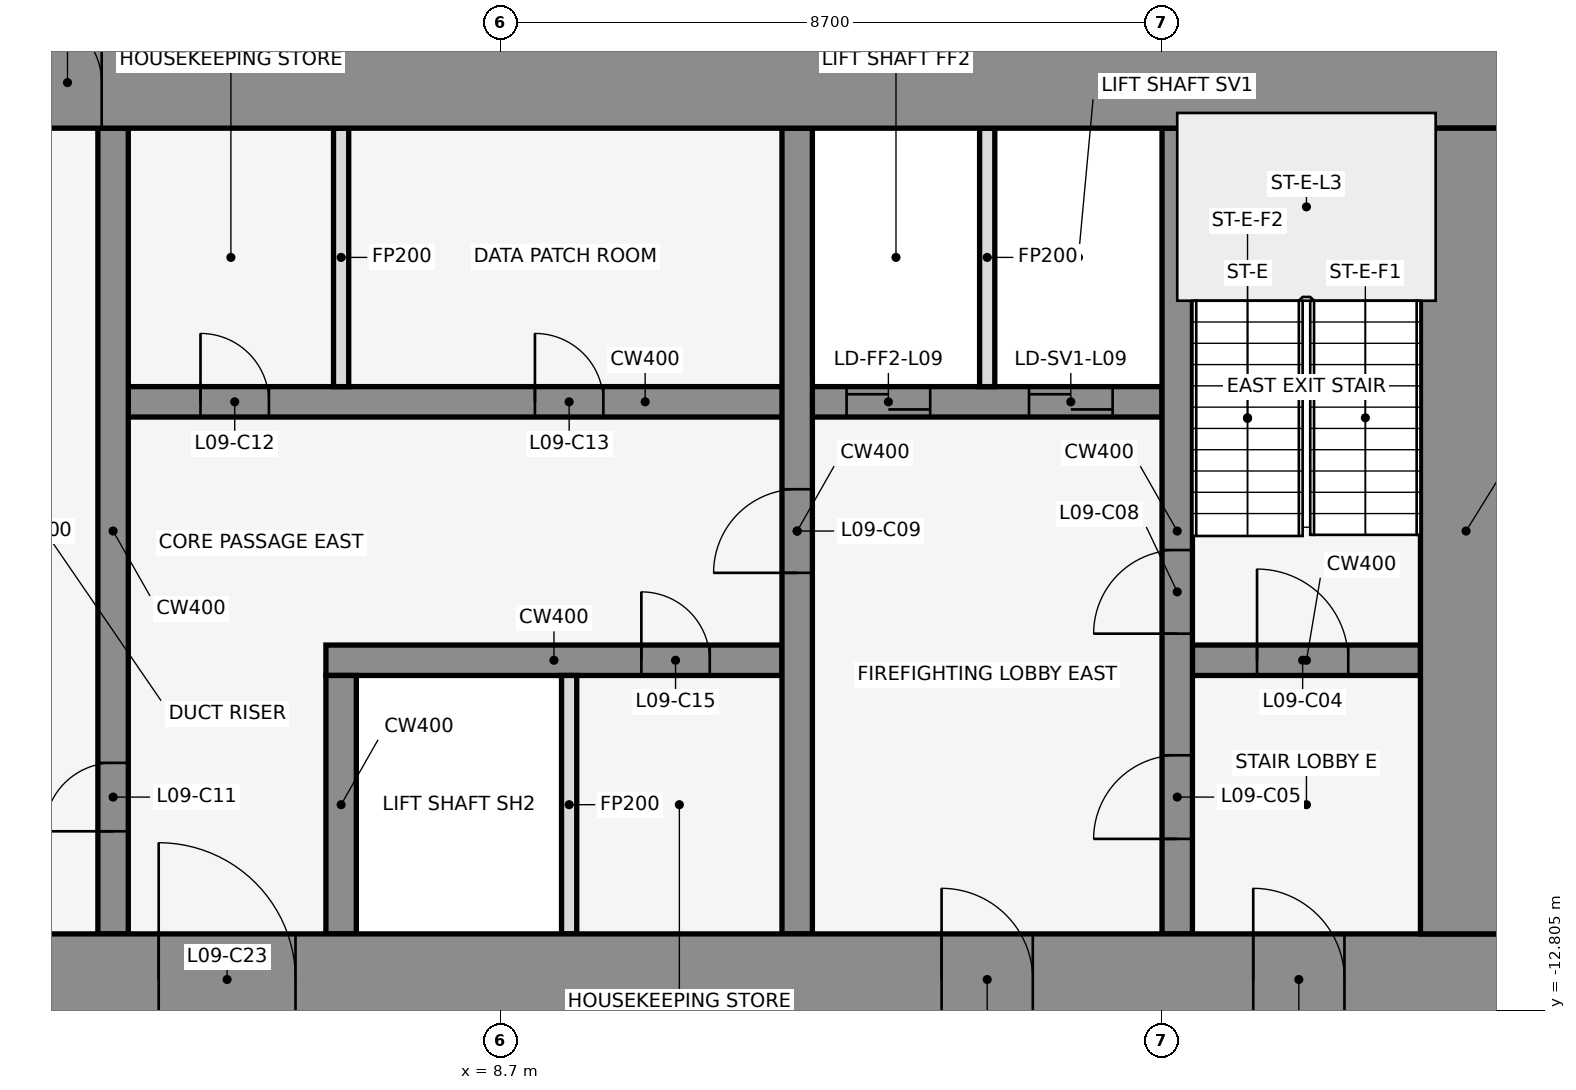
"""IFC4 building model, lengths in metres.
Left out: names, types, materials, properties, quantities, classifications, styles, units other than length and angle.
Written with IfcOpenShell. Run it as: python <this file> out.ifc"""

import sys

from ifc_helpers import new_model, si_unit, direction, frame, frame_2d, origin, place, context, subcontext, project, spatial, rectangle, extrude, element, fill, save


model = new_model("IFC4")
c1 = context("Model", 3, precision=1e-05, world=origin(), true_north=direction((0.0, 1.0)))
c2 = subcontext(c1, "Body", "Model", "MODEL_VIEW")
j1 = project(units=[si_unit("LENGTHUNIT", "METRE"), si_unit("PLANEANGLEUNIT", "RADIAN")], contexts=[c1])
p1 = place(None, origin())
s1 = spatial("IfcSite", under=j1, at=p1, CompositionType="ELEMENT")
p2 = place(p1, origin())
s2 = spatial("IfcBuilding", under=s1, at=p2, CompositionType="ELEMENT")
p3 = place(p2, frame((0.0, 0.0, 48.5)))
s3 = spatial("IfcBuildingStorey", under=s2, at=p3, CompositionType="ELEMENT", Elevation=48.5)
p4 = place(p3, frame((16.432, -0.105, 0.0), z_axis=(0.0, 0.0, 1.0), x_axis=(-0.83981312244, 0.542875602121, 0.0)))
e1 = element("IfcWall", 1, at=p4, inside=s3, PredefinedType="STANDARD", context=c2, shape_type="SweptSolid", body=[
    extrude(rectangle(XDim=2.183, YDim=0.25, at=frame_2d((1.091, 0.0))), origin(), (0.0, 0.0, 1.0), 4.35),
])
p5 = place(p3, frame((6.4, -8.2, 0.0), z_axis=(0.0, 0.0, 1.0), x_axis=(1.0, 0.0, 0.0)))
e2 = element("IfcWall", 2, at=p5, inside=s3, PredefinedType="SHEAR", context=c2, shape_type="SweptSolid", body=[
    extrude(rectangle(XDim=6.0, YDim=0.4, at=frame_2d((3.0, 0.0))), origin(), (0.0, 0.0, 1.0), 4.5),
])
p6 = place(p5, frame((4.15, 0.0, 0.0)))
e3 = element("IfcOpeningElement", 3, at=p6, cuts=e2, PredefinedType="OPENING", context=c2, shape_type="SweptSolid", body=[
    extrude(rectangle(XDim=0.9, YDim=2.1, at=frame_2d((0.45, 1.05))), frame((0.0, 0.212, 0.0), z_axis=(0.0, -1.0, 0.0), x_axis=(1.0, 0.0, 0.0)), (0.0, 0.0, 1.0), 0.424),
])
p7 = place(p3, frame((17.8, -8.2, 0.0), z_axis=(0.0, 0.0, 1.0), x_axis=(1.0, 0.0, 0.0)))
e4 = element("IfcWall", 4, at=p7, inside=s3, PredefinedType="SHEAR", context=c2, shape_type="SweptSolid", body=[
    extrude(rectangle(XDim=3.0, YDim=0.4, at=frame_2d((1.5, 0.0))), origin(), (0.0, 0.0, 1.0), 4.5),
])
p8 = place(p7, frame((0.85, 0.0, 0.0)))
e5 = element("IfcOpeningElement", 5, at=p8, cuts=e4, PredefinedType="OPENING", context=c2, shape_type="SweptSolid", body=[
    extrude(rectangle(XDim=1.2, YDim=2.1, at=frame_2d((0.6, 1.05))), frame((0.0, 0.212, 0.0), z_axis=(0.0, -1.0, 0.0), x_axis=(1.0, 0.0, 0.0)), (0.0, 0.0, 1.0), 0.424),
])
p9 = place(p3, frame((3.8, -4.8, 0.0), z_axis=(0.0, 0.0, 1.0), x_axis=(1.0, 0.0, 0.0)))
e6 = element("IfcWall", 6, at=p9, inside=s3, PredefinedType="SHEAR", context=c2, shape_type="SweptSolid", body=[
    extrude(rectangle(XDim=13.6, YDim=0.4, at=frame_2d((6.8, 0.0))), origin(), (0.0, 0.0, 1.0), 4.5),
])
p10 = place(p9, frame((9.45, 0.0, 0.0)))
e7 = element("IfcOpeningElement", 7, at=p10, cuts=e6, PredefinedType="OPENING", context=c2, shape_type="SweptSolid", body=[
    extrude(rectangle(XDim=1.1, YDim=2.1, at=frame_2d((0.55, 1.05))), frame((0.0, 0.212, 0.0), z_axis=(0.0, -1.0, 0.0), x_axis=(1.0, 0.0, 0.0)), (0.0, 0.0, 1.0), 0.424),
])
p11 = place(p9, frame((11.85, 0.0, 0.0)))
e8 = element("IfcOpeningElement", 8, at=p11, cuts=e6, PredefinedType="OPENING", context=c2, shape_type="SweptSolid", body=[
    extrude(rectangle(XDim=1.1, YDim=2.1, at=frame_2d((0.55, 1.05))), frame((0.0, 0.212, 0.0), z_axis=(0.0, -1.0, 0.0), x_axis=(1.0, 0.0, 0.0)), (0.0, 0.0, 1.0), 0.424),
])
p12 = place(p9, frame((0.95, 0.0, 0.0)))
e9 = element("IfcOpeningElement", 9, at=p12, cuts=e6, PredefinedType="OPENING", context=c2, shape_type="SweptSolid", body=[
    extrude(rectangle(XDim=0.9, YDim=2.1, at=frame_2d((0.45, 1.05))), frame((0.0, 0.212, 0.0), z_axis=(0.0, -1.0, 0.0), x_axis=(1.0, 0.0, 0.0)), (0.0, 0.0, 1.0), 0.424),
])
p13 = place(p9, frame((5.35, 0.0, 0.0)))
e10 = element("IfcOpeningElement", 10, at=p13, cuts=e6, PredefinedType="OPENING", context=c2, shape_type="SweptSolid", body=[
    extrude(rectangle(XDim=0.9, YDim=2.1, at=frame_2d((0.45, 1.05))), frame((0.0, 0.212, 0.0), z_axis=(0.0, -1.0, 0.0), x_axis=(1.0, 0.0, 0.0)), (0.0, 0.0, 1.0), 0.424),
])
p14 = place(p3, frame((3.6, -11.8, 0.0), z_axis=(0.0, 0.0, 1.0), x_axis=(0.0, 1.0, 0.0)))
e11 = element("IfcWall", 11, at=p14, inside=s3, PredefinedType="SHEAR", context=c2, shape_type="SweptSolid", body=[
    extrude(rectangle(XDim=10.6, YDim=0.4, at=frame_2d((5.3, 0.0))), origin(), (0.0, 0.0, 1.0), 4.5),
])
p15 = place(p14, frame((1.35, 0.0, 0.0)))
e12 = element("IfcOpeningElement", 12, at=p15, cuts=e11, PredefinedType="OPENING", context=c2, shape_type="SweptSolid", body=[
    extrude(rectangle(XDim=0.9, YDim=2.1, at=frame_2d((0.45, 1.05))), frame((0.0, 0.212, 0.0), z_axis=(0.0, -1.0, 0.0), x_axis=(1.0, 0.0, 0.0)), (0.0, 0.0, 1.0), 0.424),
])
p16 = place(p3, frame((6.6, -11.8, 0.0), z_axis=(0.0, 0.0, 1.0), x_axis=(0.0, 1.0, 0.0)))
e13 = element("IfcWall", 13, at=p16, inside=s3, PredefinedType="SHEAR", context=c2, shape_type="SweptSolid", body=[
    extrude(rectangle(XDim=3.4, YDim=0.4, at=frame_2d((1.7, 0.0))), origin(), (0.0, 0.0, 1.0), 4.5),
])
for number, where, z_axis, x_axis in (
    (14, (6.6, -4.6, 0.0), (0.0, 0.0, 1.0), (0.0, 1.0, 0.0)),
    (15, (9.6, -11.8, 0.0), (0.0, 0.0, 1.0), (0.0, 1.0, 0.0)),
):
    element("IfcWall", number, at=place(p3, frame(where, z_axis=z_axis, x_axis=x_axis)), inside=s3, PredefinedType="PARTITIONING", context=c2, shape_type="SweptSolid", body=[
        extrude(rectangle(XDim=3.4, YDim=0.2, at=frame_2d((1.7, 0.0))), origin(), (0.0, 0.0, 1.0), 3.418),
    ])
p17 = place(p3, frame((12.6, -11.8, 0.0), z_axis=(0.0, 0.0, 1.0), x_axis=(0.0, 1.0, 0.0)))
e16 = element("IfcWall", 16, at=p17, inside=s3, PredefinedType="SHEAR", context=c2, shape_type="SweptSolid", body=[
    extrude(rectangle(XDim=10.6, YDim=0.4, at=frame_2d((5.3, 0.0))), origin(), (0.0, 0.0, 1.0), 4.5),
])
p18 = place(p17, frame((4.75, 0.0, 0.0)))
e17 = element("IfcOpeningElement", 17, at=p18, cuts=e16, PredefinedType="OPENING", context=c2, shape_type="SweptSolid", body=[
    extrude(rectangle(XDim=1.1, YDim=2.1, at=frame_2d((0.55, 1.05))), frame((0.0, 0.212, 0.0), z_axis=(0.0, -1.0, 0.0), x_axis=(1.0, 0.0, 0.0)), (0.0, 0.0, 1.0), 0.424),
])
p19 = place(p3, frame((15.1, -4.6, 0.0), z_axis=(0.0, 0.0, 1.0), x_axis=(0.0, 1.0, 0.0)))
e18 = element("IfcWall", 18, at=p19, inside=s3, PredefinedType="PARTITIONING", context=c2, shape_type="SweptSolid", body=[
    extrude(rectangle(XDim=3.4, YDim=0.2, at=frame_2d((1.7, 0.0))), origin(), (0.0, 0.0, 1.0), 3.418),
])
p20 = place(p3, frame((17.6, -11.8, 0.0), z_axis=(0.0, 0.0, 1.0), x_axis=(0.0, 1.0, 0.0)))
e19 = element("IfcWall", 19, at=p20, inside=s3, PredefinedType="SHEAR", context=c2, shape_type="SweptSolid", body=[
    extrude(rectangle(XDim=10.6, YDim=0.4, at=frame_2d((5.3, 0.0))), origin(), (0.0, 0.0, 1.0), 4.5),
])
p21 = place(p20, frame((1.25, 0.0, 0.0)))
e20 = element("IfcOpeningElement", 20, at=p21, cuts=e19, PredefinedType="OPENING", context=c2, shape_type="SweptSolid", body=[
    extrude(rectangle(XDim=1.1, YDim=2.1, at=frame_2d((0.55, 1.05))), frame((0.0, 0.212, 0.0), z_axis=(0.0, -1.0, 0.0), x_axis=(1.0, 0.0, 0.0)), (0.0, 0.0, 1.0), 0.424),
])
p22 = place(p20, frame((3.95, 0.0, 0.0)))
e21 = element("IfcOpeningElement", 21, at=p22, cuts=e19, PredefinedType="OPENING", context=c2, shape_type="SweptSolid", body=[
    extrude(rectangle(XDim=1.1, YDim=2.1, at=frame_2d((0.55, 1.05))), frame((0.0, 0.212, 0.0), z_axis=(0.0, -1.0, 0.0), x_axis=(1.0, 0.0, 0.0)), (0.0, 0.0, 1.0), 0.424),
])
p23 = place(p3, frame((-22.0, -0.6, 0.0), z_axis=(0.0, 0.0, 1.0), x_axis=(1.0, 0.0, 0.0)))
e22 = element("IfcWall", 22, at=p23, inside=s3, PredefinedType="SHEAR", context=c2, shape_type="SweptSolid", body=[
    extrude(rectangle(XDim=44.0, YDim=1.2, at=frame_2d((22.0, 0.0))), origin(), (0.0, 0.0, 1.0), 4.5),
])
p24 = place(p23, frame((18.55, 0.0, 0.0)))
e23 = element("IfcOpeningElement", 23, at=p24, cuts=e22, PredefinedType="OPENING", context=c2, shape_type="SweptSolid", body=[
    extrude(rectangle(XDim=0.9, YDim=2.1, at=frame_2d((0.45, 1.05))), frame((0.0, 0.612, 0.0), z_axis=(0.0, -1.0, 0.0), x_axis=(1.0, 0.0, 0.0)), (0.0, 0.0, 1.0), 1.224),
])
p25 = place(p23, frame((24.55, 0.0, 0.0)))
e24 = element("IfcOpeningElement", 24, at=p25, cuts=e22, PredefinedType="OPENING", context=c2, shape_type="SweptSolid", body=[
    extrude(rectangle(XDim=0.9, YDim=2.1, at=frame_2d((0.45, 1.05))), frame((0.0, 0.612, 0.0), z_axis=(0.0, -1.0, 0.0), x_axis=(1.0, 0.0, 0.0)), (0.0, 0.0, 1.0), 1.224),
])
p26 = place(p3, frame((-22.0, -12.4, 0.0), z_axis=(0.0, 0.0, 1.0), x_axis=(1.0, 0.0, 0.0)))
e25 = element("IfcWall", 25, at=p26, inside=s3, PredefinedType="SHEAR", context=c2, shape_type="SweptSolid", body=[
    extrude(rectangle(XDim=44.0, YDim=1.2, at=frame_2d((22.0, 0.0))), origin(), (0.0, 0.0, 1.0), 4.5),
])
p27 = place(p26, frame((2.2, 0.0, 0.0)))
e26 = element("IfcOpeningElement", 26, at=p27, cuts=e25, PredefinedType="OPENING", context=c2, shape_type="SweptSolid", body=[
    extrude(rectangle(XDim=1.2, YDim=2.1, at=frame_2d((0.6, 1.05))), frame((0.0, 0.612, 0.0), z_axis=(0.0, -1.0, 0.0), x_axis=(1.0, 0.0, 0.0)), (0.0, 0.0, 1.0), 1.224),
])
p28 = place(p26, frame((21.4, 0.0, 0.0)))
e27 = element("IfcOpeningElement", 27, at=p28, cuts=e25, PredefinedType="OPENING", context=c2, shape_type="SweptSolid", body=[
    extrude(rectangle(XDim=1.2, YDim=2.1, at=frame_2d((0.6, 1.05))), frame((0.0, 0.612, 0.0), z_axis=(0.0, -1.0, 0.0), x_axis=(1.0, 0.0, 0.0)), (0.0, 0.0, 1.0), 1.224),
])
p29 = place(p26, frame((40.6, 0.0, 0.0)))
e28 = element("IfcOpeningElement", 28, at=p29, cuts=e25, PredefinedType="OPENING", context=c2, shape_type="SweptSolid", body=[
    extrude(rectangle(XDim=1.2, YDim=2.1, at=frame_2d((0.6, 1.05))), frame((0.0, 0.612, 0.0), z_axis=(0.0, -1.0, 0.0), x_axis=(1.0, 0.0, 0.0)), (0.0, 0.0, 1.0), 1.224),
])
p30 = place(p26, frame((16.0, 0.0, 0.0)))
e29 = element("IfcOpeningElement", 29, at=p30, cuts=e25, PredefinedType="OPENING", context=c2, shape_type="SweptSolid", body=[
    extrude(rectangle(XDim=1.8, YDim=2.1, at=frame_2d((0.9, 1.05))), frame((0.0, 0.612, 0.0), z_axis=(0.0, -1.0, 0.0), x_axis=(1.0, 0.0, 0.0)), (0.0, 0.0, 1.0), 1.224),
])
p31 = place(p26, frame((6.3, 0.0, 0.0)))
e30 = element("IfcOpeningElement", 30, at=p31, cuts=e25, PredefinedType="OPENING", context=c2, shape_type="SweptSolid", body=[
    extrude(rectangle(XDim=1.2, YDim=2.1, at=frame_2d((0.6, 1.05))), frame((0.0, 0.612, 0.0), z_axis=(0.0, -1.0, 0.0), x_axis=(1.0, 0.0, 0.0)), (0.0, 0.0, 1.0), 1.224),
])
p32 = place(p26, frame((26.2, 0.0, 0.0)))
e31 = element("IfcOpeningElement", 31, at=p32, cuts=e25, PredefinedType="OPENING", context=c2, shape_type="SweptSolid", body=[
    extrude(rectangle(XDim=1.8, YDim=2.1, at=frame_2d((0.9, 1.05))), frame((0.0, 0.612, 0.0), z_axis=(0.0, -1.0, 0.0), x_axis=(1.0, 0.0, 0.0)), (0.0, 0.0, 1.0), 1.224),
])
p33 = place(p26, frame((36.5, 0.0, 0.0)))
e32 = element("IfcOpeningElement", 32, at=p33, cuts=e25, PredefinedType="OPENING", context=c2, shape_type="SweptSolid", body=[
    extrude(rectangle(XDim=1.2, YDim=2.1, at=frame_2d((0.6, 1.05))), frame((0.0, 0.612, 0.0), z_axis=(0.0, -1.0, 0.0), x_axis=(1.0, 0.0, 0.0)), (0.0, 0.0, 1.0), 1.224),
])
p34 = place(p3, frame((21.4, -11.8, 0.0), z_axis=(0.0, 0.0, 1.0), x_axis=(0.0, 1.0, 0.0)))
e33 = element("IfcWall", 33, at=p34, inside=s3, PredefinedType="SHEAR", context=c2, shape_type="SweptSolid", body=[
    extrude(rectangle(XDim=10.6, YDim=1.2, at=frame_2d((5.3, 0.0))), origin(), (0.0, 0.0, 1.0), 4.5),
])
p35 = place(p8, origin())
e34 = element("IfcDoor", 34, at=p35, inside=s3, OperationType="SINGLE_SWING_RIGHT", PredefinedType="DOOR", context=c2, shape_type="SweptSolid", body=[
    extrude(rectangle(XDim=1.2, YDim=2.1, at=frame_2d((0.6, 1.05))), frame((0.0, 0.025, 0.0), z_axis=(0.0, -1.0, 0.0), x_axis=(1.0, 0.0, 0.0)), (0.0, 0.0, 1.0), 0.05),
])
fill(e5, e34)
p36 = place(p21, origin())
e35 = element("IfcDoor", 35, at=p36, inside=s3, OperationType="SINGLE_SWING_LEFT", PredefinedType="DOOR", context=c2, shape_type="SweptSolid", body=[
    extrude(rectangle(XDim=1.1, YDim=2.1, at=frame_2d((0.55, 1.05))), frame((0.0, 0.025, 0.0), z_axis=(0.0, -1.0, 0.0), x_axis=(1.0, 0.0, 0.0)), (0.0, 0.0, 1.0), 0.05),
])
fill(e20, e35)
p37 = place(p10, origin())
e36 = element("IfcDoor", 36, at=p37, inside=s3, OperationType="DOUBLE_DOOR_SLIDING", PredefinedType="DOOR", context=c2, shape_type="SweptSolid", body=[
    extrude(rectangle(XDim=1.1, YDim=2.1, at=frame_2d((0.55, 1.05))), frame((0.0, 0.025, 0.0), z_axis=(0.0, -1.0, 0.0), x_axis=(1.0, 0.0, 0.0)), (0.0, 0.0, 1.0), 0.05),
])
fill(e7, e36)
p38 = place(p11, origin())
e37 = element("IfcDoor", 37, at=p38, inside=s3, OperationType="DOUBLE_DOOR_SLIDING", PredefinedType="DOOR", context=c2, shape_type="SweptSolid", body=[
    extrude(rectangle(XDim=1.1, YDim=2.1, at=frame_2d((0.55, 1.05))), frame((0.0, 0.025, 0.0), z_axis=(0.0, -1.0, 0.0), x_axis=(1.0, 0.0, 0.0)), (0.0, 0.0, 1.0), 0.05),
])
fill(e8, e37)
p39 = place(p22, origin())
e38 = element("IfcDoor", 38, at=p39, inside=s3, OperationType="SINGLE_SWING_RIGHT", PredefinedType="DOOR", context=c2, shape_type="SweptSolid", body=[
    extrude(rectangle(XDim=1.1, YDim=2.1, at=frame_2d((0.55, 1.05))), frame((0.0, 0.025, 0.0), z_axis=(0.0, -1.0, 0.0), x_axis=(1.0, 0.0, 0.0)), (0.0, 0.0, 1.0), 0.05),
])
fill(e21, e38)
p40 = place(p18, frame((1.1, 0.0, 0.0), z_axis=(0.0, 0.0, 1.0), x_axis=(-1.0, 0.0, 0.0)))
e39 = element("IfcDoor", 39, at=p40, inside=s3, OperationType="SINGLE_SWING_RIGHT", PredefinedType="DOOR", context=c2, shape_type="SweptSolid", body=[
    extrude(rectangle(XDim=1.1, YDim=2.1, at=frame_2d((0.55, 1.05))), frame((0.0, 0.025, 0.0), z_axis=(0.0, -1.0, 0.0), x_axis=(1.0, 0.0, 0.0)), (0.0, 0.0, 1.0), 0.05),
])
fill(e17, e39)
p41 = place(p15, origin())
e40 = element("IfcDoor", 40, at=p41, inside=s3, OperationType="SINGLE_SWING_LEFT", PredefinedType="DOOR", context=c2, shape_type="SweptSolid", body=[
    extrude(rectangle(XDim=0.9, YDim=2.1, at=frame_2d((0.45, 1.05))), frame((0.0, 0.025, 0.0), z_axis=(0.0, -1.0, 0.0), x_axis=(1.0, 0.0, 0.0)), (0.0, 0.0, 1.0), 0.05),
])
fill(e12, e40)
p42 = place(p12, origin())
e41 = element("IfcDoor", 41, at=p42, inside=s3, OperationType="SINGLE_SWING_RIGHT", PredefinedType="DOOR", context=c2, shape_type="SweptSolid", body=[
    extrude(rectangle(XDim=0.9, YDim=2.1, at=frame_2d((0.45, 1.05))), frame((0.0, 0.025, 0.0), z_axis=(0.0, -1.0, 0.0), x_axis=(1.0, 0.0, 0.0)), (0.0, 0.0, 1.0), 0.05),
])
fill(e9, e41)
p43 = place(p13, origin())
e42 = element("IfcDoor", 42, at=p43, inside=s3, OperationType="SINGLE_SWING_LEFT", PredefinedType="DOOR", context=c2, shape_type="SweptSolid", body=[
    extrude(rectangle(XDim=0.9, YDim=2.1, at=frame_2d((0.45, 1.05))), frame((0.0, 0.025, 0.0), z_axis=(0.0, -1.0, 0.0), x_axis=(1.0, 0.0, 0.0)), (0.0, 0.0, 1.0), 0.05),
])
fill(e10, e42)
p44 = place(p6, frame((0.9, 0.0, 0.0), z_axis=(0.0, 0.0, 1.0), x_axis=(-1.0, 0.0, 0.0)))
e43 = element("IfcDoor", 43, at=p44, inside=s3, OperationType="SINGLE_SWING_RIGHT", PredefinedType="DOOR", context=c2, shape_type="SweptSolid", body=[
    extrude(rectangle(XDim=0.9, YDim=2.1, at=frame_2d((0.45, 1.05))), frame((0.0, 0.025, 0.0), z_axis=(0.0, -1.0, 0.0), x_axis=(1.0, 0.0, 0.0)), (0.0, 0.0, 1.0), 0.05),
])
fill(e3, e43)
p45 = place(p25, origin())
e44 = element("IfcDoor", 44, at=p45, inside=s3, OperationType="SINGLE_SWING_LEFT", PredefinedType="DOOR", context=c2, shape_type="SweptSolid", body=[
    extrude(rectangle(XDim=0.9, YDim=2.1, at=frame_2d((0.45, 1.05))), frame((0.0, 0.025, 0.0), z_axis=(0.0, -1.0, 0.0), x_axis=(1.0, 0.0, 0.0)), (0.0, 0.0, 1.0), 0.05),
])
fill(e24, e44)
p46 = place(p29, frame((1.2, 0.0, 0.0), z_axis=(0.0, 0.0, 1.0), x_axis=(-1.0, 0.0, 0.0)))
e45 = element("IfcDoor", 45, at=p46, inside=s3, OperationType="SINGLE_SWING_RIGHT", PredefinedType="DOOR", context=c2, shape_type="SweptSolid", body=[
    extrude(rectangle(XDim=1.2, YDim=2.1, at=frame_2d((0.6, 1.05))), frame((0.0, 0.025, 0.0), z_axis=(0.0, -1.0, 0.0), x_axis=(1.0, 0.0, 0.0)), (0.0, 0.0, 1.0), 0.05),
])
fill(e28, e45)
p47 = place(p32, origin())
e46 = element("IfcDoor", 46, at=p47, inside=s3, OperationType="SINGLE_SWING_LEFT", PredefinedType="DOOR", context=c2, shape_type="SweptSolid", body=[
    extrude(rectangle(XDim=1.8, YDim=2.1, at=frame_2d((0.9, 1.05))), frame((0.0, 0.025, 0.0), z_axis=(0.0, -1.0, 0.0), x_axis=(1.0, 0.0, 0.0)), (0.0, 0.0, 1.0), 0.05),
])
fill(e31, e46)
p48 = place(p33, frame((1.2, 0.0, 0.0), z_axis=(0.0, 0.0, 1.0), x_axis=(-1.0, 0.0, 0.0)))
e47 = element("IfcDoor", 47, at=p48, inside=s3, OperationType="SINGLE_SWING_RIGHT", PredefinedType="DOOR", context=c2, shape_type="SweptSolid", body=[
    extrude(rectangle(XDim=1.2, YDim=2.1, at=frame_2d((0.6, 1.05))), frame((0.0, 0.025, 0.0), z_axis=(0.0, -1.0, 0.0), x_axis=(1.0, 0.0, 0.0)), (0.0, 0.0, 1.0), 0.05),
])
fill(e32, e47)
save(model, sys.argv[1])
